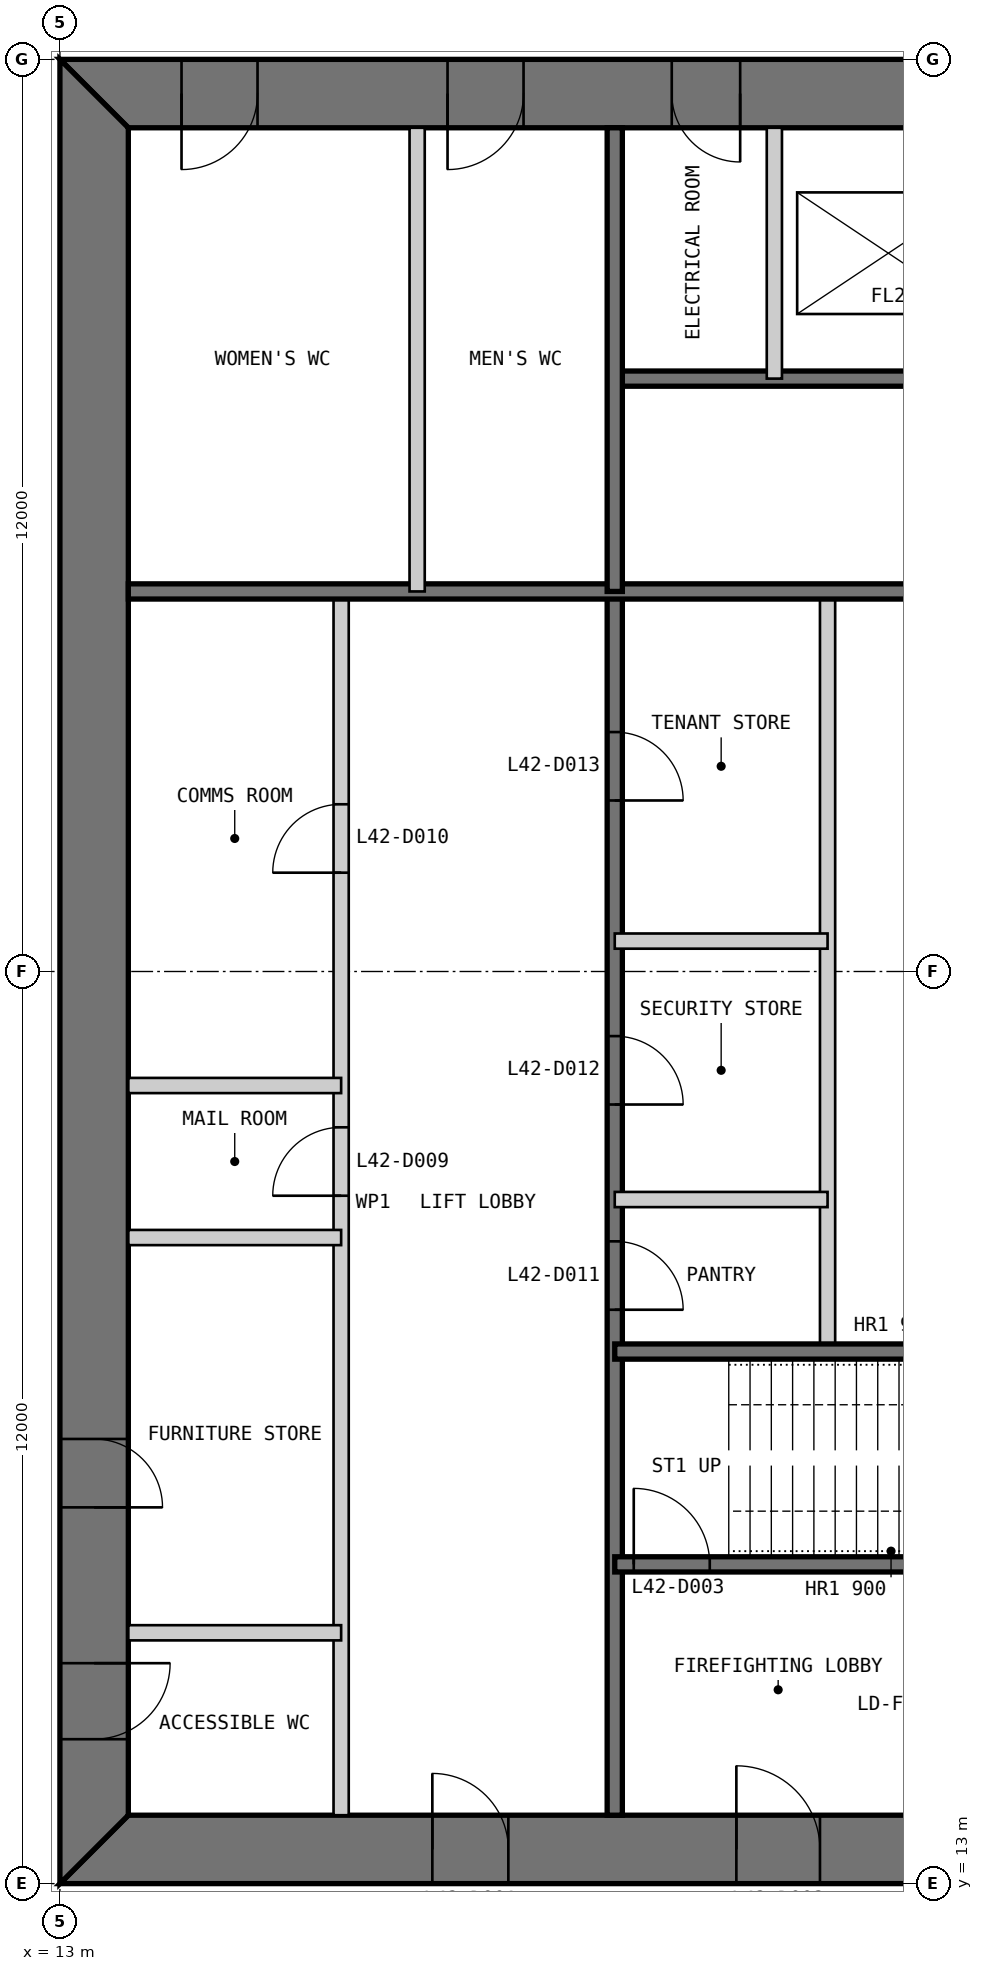
"""IFC4 building model, lengths in metres.
Left out: names, types, materials, properties, quantities, classifications, styles, units other than length and angle.
Written with IfcOpenShell. Run it as: python <this file> out.ifc"""

import sys

from ifc_helpers import new_model, si_unit, direction, frame, frame_2d, origin, place, context, subcontext, project, spatial, polyline, rectangle, outline, extrude, element, fill, save


model = new_model("IFC4")
c1 = context("Model", 3, precision=1e-05, world=origin(), true_north=direction((0.0, 1.0)))
c2 = subcontext(c1, "Body", "Model", "MODEL_VIEW")
j1 = project(units=[si_unit("LENGTHUNIT", "METRE"), si_unit("PLANEANGLEUNIT", "RADIAN")], contexts=[c1])
p1 = place(None, origin())
s1 = spatial("IfcSite", under=j1, at=p1, CompositionType="ELEMENT")
p2 = place(p1, origin())
s2 = spatial("IfcBuilding", under=s1, at=p2, CompositionType="ELEMENT")
p3 = place(p2, frame((0.0, 0.0, 181.8)))
s3 = spatial("IfcBuildingStorey", under=s2, at=p3, CompositionType="ELEMENT", Elevation=181.8)
p4 = place(p3, frame((13.0, 13.45, 0.0), z_axis=(0.0, 0.0, 1.0), x_axis=(1.0, 0.0, 0.0)))
e1 = element("IfcWall", 1, at=p4, inside=s3, PredefinedType="SHEAR", context=c2, shape_type="SweptSolid", body=[
    extrude(outline(polyline([(0.0, -0.45), (24.0, -0.45), (23.1, 0.45), (0.9, 0.45), (0.0, -0.45)])), origin(), (0.0, 0.0, 1.0), 4.0),
])
p5 = place(p4, frame((4.9, 0.0, 0.0)))
e2 = element("IfcOpeningElement", 2, at=p5, cuts=e1, PredefinedType="OPENING", context=c2, shape_type="SweptSolid", body=[
    extrude(rectangle(XDim=1.0, YDim=2.2, at=frame_2d((0.5, 1.1))), frame((0.0, 0.46, 0.0), z_axis=(0.0, -1.0, 0.0), x_axis=(1.0, 0.0, 0.0)), (0.0, 0.0, 1.0), 0.92),
])
p6 = place(p4, frame((8.9, 0.0, 0.0)))
e3 = element("IfcOpeningElement", 3, at=p6, cuts=e1, PredefinedType="OPENING", context=c2, shape_type="SweptSolid", body=[
    extrude(rectangle(XDim=1.1, YDim=2.2, at=frame_2d((0.55, 1.1))), frame((0.0, 0.46, 0.0), z_axis=(0.0, -1.0, 0.0), x_axis=(1.0, 0.0, 0.0)), (0.0, 0.0, 1.0), 0.92),
])
p7 = place(p4, frame((15.05, 0.0, 0.0)))
e4 = element("IfcOpeningElement", 4, at=p7, cuts=e1, PredefinedType="OPENING", context=c2, shape_type="SweptSolid", body=[
    extrude(rectangle(XDim=0.9, YDim=2.2, at=frame_2d((0.45, 1.1))), frame((0.0, 0.46, 0.0), z_axis=(0.0, -1.0, 0.0), x_axis=(1.0, 0.0, 0.0)), (0.0, 0.0, 1.0), 0.92),
])
p8 = place(p4, frame((17.9, 0.0, 0.0)))
e5 = element("IfcOpeningElement", 5, at=p8, cuts=e1, PredefinedType="OPENING", context=c2, shape_type="SweptSolid", body=[
    extrude(rectangle(XDim=1.0, YDim=2.2, at=frame_2d((0.5, 1.1))), frame((0.0, 0.46, 0.0), z_axis=(0.0, -1.0, 0.0), x_axis=(1.0, 0.0, 0.0)), (0.0, 0.0, 1.0), 0.92),
])
p9 = place(p4, frame((21.4, 0.0, 0.0)))
e6 = element("IfcOpeningElement", 6, at=p9, cuts=e1, PredefinedType="OPENING", context=c2, shape_type="SweptSolid", body=[
    extrude(rectangle(XDim=1.0, YDim=2.2, at=frame_2d((0.5, 1.1))), frame((0.0, 0.46, 0.0), z_axis=(0.0, -1.0, 0.0), x_axis=(1.0, 0.0, 0.0)), (0.0, 0.0, 1.0), 0.92),
])
p10 = place(p3, frame((37.0, 36.55, 0.0), z_axis=(0.0, 0.0, 1.0), x_axis=(-1.0, 0.0, 0.0)))
e7 = element("IfcWall", 7, at=p10, inside=s3, PredefinedType="SHEAR", context=c2, shape_type="SweptSolid", body=[
    extrude(outline(polyline([(0.0, -0.45), (24.0, -0.45), (23.1, 0.45), (0.9, 0.45), (0.0, -0.45)])), origin(), (0.0, 0.0, 1.0), 4.0),
])
p11 = place(p10, frame((4.9, 0.0, 0.0)))
e8 = element("IfcOpeningElement", 8, at=p11, cuts=e7, PredefinedType="OPENING", context=c2, shape_type="SweptSolid", body=[
    extrude(rectangle(XDim=1.0, YDim=2.2, at=frame_2d((0.5, 1.1))), frame((0.0, 0.46, 0.0), z_axis=(0.0, -1.0, 0.0), x_axis=(1.0, 0.0, 0.0)), (0.0, 0.0, 1.0), 0.92),
])
p12 = place(p10, frame((8.9, 0.0, 0.0)))
e9 = element("IfcOpeningElement", 9, at=p12, cuts=e7, PredefinedType="OPENING", context=c2, shape_type="SweptSolid", body=[
    extrude(rectangle(XDim=1.1, YDim=2.2, at=frame_2d((0.55, 1.1))), frame((0.0, 0.46, 0.0), z_axis=(0.0, -1.0, 0.0), x_axis=(1.0, 0.0, 0.0)), (0.0, 0.0, 1.0), 0.92),
])
p13 = place(p10, frame((15.05, 0.0, 0.0)))
e10 = element("IfcOpeningElement", 10, at=p13, cuts=e7, PredefinedType="OPENING", context=c2, shape_type="SweptSolid", body=[
    extrude(rectangle(XDim=0.9, YDim=2.2, at=frame_2d((0.45, 1.1))), frame((0.0, 0.46, 0.0), z_axis=(0.0, -1.0, 0.0), x_axis=(1.0, 0.0, 0.0)), (0.0, 0.0, 1.0), 0.92),
])
p14 = place(p10, frame((17.9, 0.0, 0.0)))
e11 = element("IfcOpeningElement", 11, at=p14, cuts=e7, PredefinedType="OPENING", context=c2, shape_type="SweptSolid", body=[
    extrude(rectangle(XDim=1.0, YDim=2.2, at=frame_2d((0.5, 1.1))), frame((0.0, 0.46, 0.0), z_axis=(0.0, -1.0, 0.0), x_axis=(1.0, 0.0, 0.0)), (0.0, 0.0, 1.0), 0.92),
])
p15 = place(p10, frame((21.4, 0.0, 0.0)))
e12 = element("IfcOpeningElement", 12, at=p15, cuts=e7, PredefinedType="OPENING", context=c2, shape_type="SweptSolid", body=[
    extrude(rectangle(XDim=1.0, YDim=2.2, at=frame_2d((0.5, 1.1))), frame((0.0, 0.46, 0.0), z_axis=(0.0, -1.0, 0.0), x_axis=(1.0, 0.0, 0.0)), (0.0, 0.0, 1.0), 0.92),
])
p16 = place(p3, frame((13.45, 36.1, 0.0), z_axis=(0.0, 0.0, 1.0), x_axis=(0.0, -1.0, 0.0)))
e13 = element("IfcWall", 13, at=p16, inside=s3, PredefinedType="SHEAR", context=c2, shape_type="SweptSolid", body=[
    extrude(outline(polyline([(-0.9, -0.45), (23.1, -0.45), (22.2, 0.45), (0.0, 0.45), (-0.9, -0.45)])), origin(), (0.0, 0.0, 1.0), 4.0),
])
p17 = place(p16, frame((20.2, 0.0, 0.0)))
e14 = element("IfcOpeningElement", 14, at=p17, cuts=e13, PredefinedType="OPENING", context=c2, shape_type="SweptSolid", body=[
    extrude(rectangle(XDim=1.0, YDim=2.2, at=frame_2d((0.5, 1.1))), frame((0.0, 0.46, 0.0), z_axis=(0.0, -1.0, 0.0), x_axis=(1.0, 0.0, 0.0)), (0.0, 0.0, 1.0), 0.92),
])
p18 = place(p16, frame((17.25, 0.0, 0.0)))
e15 = element("IfcOpeningElement", 15, at=p18, cuts=e13, PredefinedType="OPENING", context=c2, shape_type="SweptSolid", body=[
    extrude(rectangle(XDim=0.9, YDim=2.2, at=frame_2d((0.45, 1.1))), frame((0.0, 0.46, 0.0), z_axis=(0.0, -1.0, 0.0), x_axis=(1.0, 0.0, 0.0)), (0.0, 0.0, 1.0), 0.92),
])
p19 = place(p3, frame((16.7, 13.9, 0.0), z_axis=(0.0, 0.0, 1.0), x_axis=(0.0, 1.0, 0.0)))
e16 = element("IfcWall", 16, at=p19, inside=s3, PredefinedType="PARTITIONING", context=c2, shape_type="SweptSolid", body=[
    extrude(rectangle(XDim=16.1, YDim=0.2, at=frame_2d((8.05, 0.0))), origin(), (0.0, 0.0, 1.0), 3.8),
])
p20 = place(p19, frame((8.15, 0.0, 0.0)))
e17 = element("IfcOpeningElement", 17, at=p20, cuts=e16, PredefinedType="OPENING", context=c2, shape_type="SweptSolid", body=[
    extrude(rectangle(XDim=0.9, YDim=2.2, at=frame_2d((0.45, 1.1))), frame((0.0, 0.11, 0.0), z_axis=(0.0, -1.0, 0.0), x_axis=(1.0, 0.0, 0.0)), (0.0, 0.0, 1.0), 0.22),
])
p21 = place(p19, frame((12.4, 0.0, 0.0)))
e18 = element("IfcOpeningElement", 18, at=p21, cuts=e16, PredefinedType="OPENING", context=c2, shape_type="SweptSolid", body=[
    extrude(rectangle(XDim=0.9, YDim=2.2, at=frame_2d((0.45, 1.1))), frame((0.0, 0.11, 0.0), z_axis=(0.0, -1.0, 0.0), x_axis=(1.0, 0.0, 0.0)), (0.0, 0.0, 1.0), 0.22),
])
p22 = place(p3, frame((20.3, 13.9, 0.0), z_axis=(0.0, 0.0, 1.0), x_axis=(0.0, 1.0, 0.0)))
e19 = element("IfcWall", 19, at=p22, inside=s3, PredefinedType="SOLIDWALL", context=c2, shape_type="SweptSolid", body=[
    extrude(rectangle(XDim=16.1, YDim=0.2, at=frame_2d((8.05, 0.0))), origin(), (0.0, 0.0, 1.0), 3.8),
])
p23 = place(p22, frame((6.65, 0.0, 0.0)))
e20 = element("IfcOpeningElement", 20, at=p23, cuts=e19, PredefinedType="OPENING", context=c2, shape_type="SweptSolid", body=[
    extrude(rectangle(XDim=0.9, YDim=2.2, at=frame_2d((0.45, 1.1))), frame((0.0, 0.11, 0.0), z_axis=(0.0, -1.0, 0.0), x_axis=(1.0, 0.0, 0.0)), (0.0, 0.0, 1.0), 0.22),
])
p24 = place(p22, frame((9.35, 0.0, 0.0)))
e21 = element("IfcOpeningElement", 21, at=p24, cuts=e19, PredefinedType="OPENING", context=c2, shape_type="SweptSolid", body=[
    extrude(rectangle(XDim=0.9, YDim=2.2, at=frame_2d((0.45, 1.1))), frame((0.0, 0.11, 0.0), z_axis=(0.0, -1.0, 0.0), x_axis=(1.0, 0.0, 0.0)), (0.0, 0.0, 1.0), 0.22),
])
p25 = place(p22, frame((13.35, 0.0, 0.0)))
e22 = element("IfcOpeningElement", 22, at=p25, cuts=e19, PredefinedType="OPENING", context=c2, shape_type="SweptSolid", body=[
    extrude(rectangle(XDim=0.9, YDim=2.2, at=frame_2d((0.45, 1.1))), frame((0.0, 0.11, 0.0), z_axis=(0.0, -1.0, 0.0), x_axis=(1.0, 0.0, 0.0)), (0.0, 0.0, 1.0), 0.22),
])
p26 = place(p3, frame((23.1, 20.0, 0.0), z_axis=(0.0, 0.0, 1.0), x_axis=(0.0, 1.0, 0.0)))
e23 = element("IfcWall", 23, at=p26, inside=s3, PredefinedType="PARTITIONING", context=c2, shape_type="SweptSolid", body=[
    extrude(rectangle(XDim=10.0, YDim=0.2, at=frame_2d((5.0, 0.0))), origin(), (0.0, 0.0, 1.0), 3.8),
])
p27 = place(p3, frame((20.3, 17.2, 0.0), z_axis=(0.0, 0.0, 1.0), x_axis=(1.0, 0.0, 0.0)))
e24 = element("IfcWall", 24, at=p27, inside=s3, PredefinedType="SOLIDWALL", context=c2, shape_type="SweptSolid", body=[
    extrude(rectangle(XDim=9.4, YDim=0.2, at=frame_2d((4.7, 0.0))), origin(), (0.0, 0.0, 1.0), 3.8),
])
p28 = place(p27, frame((0.25, 0.0, 0.0)))
e25 = element("IfcOpeningElement", 25, at=p28, cuts=e24, PredefinedType="OPENING", context=c2, shape_type="SweptSolid", body=[
    extrude(rectangle(XDim=1.0, YDim=2.2, at=frame_2d((0.5, 1.1))), frame((0.0, 0.11, 0.0), z_axis=(0.0, -1.0, 0.0), x_axis=(1.0, 0.0, 0.0)), (0.0, 0.0, 1.0), 0.22),
])
p29 = place(p3, frame((20.3, 20.0, 0.0), z_axis=(0.0, 0.0, 1.0), x_axis=(1.0, 0.0, 0.0)))
e26 = element("IfcWall", 26, at=p29, inside=s3, PredefinedType="SOLIDWALL", context=c2, shape_type="SweptSolid", body=[
    extrude(rectangle(XDim=15.8, YDim=0.2, at=frame_2d((7.9, 0.0))), origin(), (0.0, 0.0, 1.0), 3.8),
])
for number, where, z_axis, x_axis in (
    (27, (13.9, 16.3, 0.0), (0.0, 0.0, 1.0), (1.0, 0.0, 0.0)),
    (28, (13.9, 21.5, 0.0), (0.0, 0.0, 1.0), (1.0, 0.0, 0.0)),
    (29, (13.9, 23.5, 0.0), (0.0, 0.0, 1.0), (1.0, 0.0, 0.0)),
    (30, (20.3, 22.0, 0.0), (0.0, 0.0, 1.0), (1.0, 0.0, 0.0)),
    (31, (20.3, 25.4, 0.0), (0.0, 0.0, 1.0), (1.0, 0.0, 0.0)),
):
    element("IfcWall", number, at=place(p3, frame(where, z_axis=z_axis, x_axis=x_axis)), inside=s3, PredefinedType="PARTITIONING", context=c2, shape_type="SweptSolid", body=[
        extrude(rectangle(XDim=2.8, YDim=0.2, at=frame_2d((1.4, 0.0))), origin(), (0.0, 0.0, 1.0), 3.8),
    ])
p30 = place(p3, frame((29.7, 32.8, 0.0), z_axis=(0.0, 0.0, 1.0), x_axis=(-1.0, 0.0, 0.0)))
e32 = element("IfcWall", 32, at=p30, inside=s3, PredefinedType="SOLIDWALL", context=c2, shape_type="SweptSolid", body=[
    extrude(rectangle(XDim=9.4, YDim=0.2, at=frame_2d((4.7, 0.0))), origin(), (0.0, 0.0, 1.0), 3.8),
])
p31 = place(p30, frame((0.25, 0.0, 0.0)))
e33 = element("IfcOpeningElement", 33, at=p31, cuts=e32, PredefinedType="OPENING", context=c2, shape_type="SweptSolid", body=[
    extrude(rectangle(XDim=1.0, YDim=2.2, at=frame_2d((0.5, 1.1))), frame((0.0, 0.11, 0.0), z_axis=(0.0, -1.0, 0.0), x_axis=(1.0, 0.0, 0.0)), (0.0, 0.0, 1.0), 0.22),
])
p32 = place(p3, frame((29.7, 30.0, 0.0), z_axis=(0.0, 0.0, 1.0), x_axis=(-1.0, 0.0, 0.0)))
e34 = element("IfcWall", 34, at=p32, inside=s3, PredefinedType="SOLIDWALL", context=c2, shape_type="SweptSolid", body=[
    extrude(rectangle(XDim=15.8, YDim=0.2, at=frame_2d((7.9, 0.0))), origin(), (0.0, 0.0, 1.0), 3.8),
])
p33 = place(p3, frame((22.4, 36.1, 0.0), z_axis=(0.0, 0.0, 1.0), x_axis=(0.0, -1.0, 0.0)))
e35 = element("IfcWall", 35, at=p33, inside=s3, PredefinedType="PARTITIONING", context=c2, shape_type="SweptSolid", body=[
    extrude(rectangle(XDim=3.3, YDim=0.2, at=frame_2d((1.65, 0.0))), origin(), (0.0, 0.0, 1.0), 3.8),
])
p34 = place(p3, frame((20.3, 36.1, 0.0), z_axis=(0.0, 0.0, 1.0), x_axis=(0.0, -1.0, 0.0)))
e36 = element("IfcWall", 36, at=p34, inside=s3, PredefinedType="SOLIDWALL", context=c2, shape_type="SweptSolid", body=[
    extrude(rectangle(XDim=6.1, YDim=0.2, at=frame_2d((3.05, 0.0))), origin(), (0.0, 0.0, 1.0), 3.8),
])
p35 = place(p3, frame((17.7, 36.1, 0.0), z_axis=(0.0, 0.0, 1.0), x_axis=(0.0, -1.0, 0.0)))
e37 = element("IfcWall", 37, at=p35, inside=s3, PredefinedType="PARTITIONING", context=c2, shape_type="SweptSolid", body=[
    extrude(rectangle(XDim=6.1, YDim=0.2, at=frame_2d((3.05, 0.0))), origin(), (0.0, 0.0, 1.0), 3.8),
])
p36 = place(p5, origin())
e38 = element("IfcDoor", 38, at=p36, inside=s3, OperationType="SINGLE_SWING_LEFT", PredefinedType="DOOR", context=c2, shape_type="SweptSolid", body=[
    extrude(rectangle(XDim=1.0, YDim=2.2, at=frame_2d((0.5, 1.1))), frame((0.0, 0.025, 0.0), z_axis=(0.0, -1.0, 0.0), x_axis=(1.0, 0.0, 0.0)), (0.0, 0.0, 1.0), 0.05),
    extrude(outline(polyline([(0.0, 0.0), (0.04, 0.0), (0.04, 2.16), (0.96, 2.16), (0.96, 0.0), (1.0, 0.0), (1.0, 2.2), (0.0, 2.2), (0.0, 0.0)])), frame((0.0, 0.3, 0.0), z_axis=(0.0, -1.0, 0.0), x_axis=(1.0, 0.0, 0.0)), (0.0, 0.0, 1.0), 0.6),
])
fill(e2, e38)
p37 = place(p6, origin())
e39 = element("IfcDoor", 39, at=p37, inside=s3, OperationType="SINGLE_SWING_LEFT", PredefinedType="DOOR", context=c2, shape_type="SweptSolid", body=[
    extrude(rectangle(XDim=1.1, YDim=2.2, at=frame_2d((0.55, 1.1))), frame((0.0, 0.025, 0.0), z_axis=(0.0, -1.0, 0.0), x_axis=(1.0, 0.0, 0.0)), (0.0, 0.0, 1.0), 0.05),
    extrude(outline(polyline([(0.0, 0.0), (0.04, 0.0), (0.04, 2.16), (1.06, 2.16), (1.06, 0.0), (1.1, 0.0), (1.1, 2.2), (0.0, 2.2), (0.0, 0.0)])), frame((0.0, 0.3, 0.0), z_axis=(0.0, -1.0, 0.0), x_axis=(1.0, 0.0, 0.0)), (0.0, 0.0, 1.0), 0.6),
])
fill(e3, e39)
p38 = place(p28, origin())
e40 = element("IfcDoor", 40, at=p38, inside=s3, OperationType="SINGLE_SWING_LEFT", PredefinedType="DOOR", context=c2, shape_type="SweptSolid", body=[
    extrude(rectangle(XDim=1.0, YDim=2.2, at=frame_2d((0.5, 1.1))), frame((0.0, 0.025, 0.0), z_axis=(0.0, -1.0, 0.0), x_axis=(1.0, 0.0, 0.0)), (0.0, 0.0, 1.0), 0.05),
])
fill(e25, e40)
p39 = place(p17, origin())
e41 = element("IfcDoor", 41, at=p39, inside=s3, OperationType="SINGLE_SWING_LEFT", PredefinedType="DOOR", context=c2, shape_type="SweptSolid", body=[
    extrude(rectangle(XDim=1.0, YDim=2.2, at=frame_2d((0.5, 1.1))), frame((0.0, 0.025, 0.0), z_axis=(0.0, -1.0, 0.0), x_axis=(1.0, 0.0, 0.0)), (0.0, 0.0, 1.0), 0.05),
    extrude(outline(polyline([(0.0, 0.0), (0.04, 0.0), (0.04, 2.16), (0.96, 2.16), (0.96, 0.0), (1.0, 0.0), (1.0, 2.2), (0.0, 2.2), (0.0, 0.0)])), frame((0.0, 0.3, 0.0), z_axis=(0.0, -1.0, 0.0), x_axis=(1.0, 0.0, 0.0)), (0.0, 0.0, 1.0), 0.6),
])
fill(e14, e41)
p40 = place(p18, origin())
e42 = element("IfcDoor", 42, at=p40, inside=s3, OperationType="SINGLE_SWING_RIGHT", PredefinedType="DOOR", context=c2, shape_type="SweptSolid", body=[
    extrude(rectangle(XDim=0.9, YDim=2.2, at=frame_2d((0.45, 1.1))), frame((0.0, 0.025, 0.0), z_axis=(0.0, -1.0, 0.0), x_axis=(1.0, 0.0, 0.0)), (0.0, 0.0, 1.0), 0.05),
    extrude(outline(polyline([(0.0, 0.0), (0.04, 0.0), (0.04, 2.16), (0.86, 2.16), (0.86, 0.0), (0.9, 0.0), (0.9, 2.2), (0.0, 2.2), (0.0, 0.0)])), frame((0.0, 0.3, 0.0), z_axis=(0.0, -1.0, 0.0), x_axis=(1.0, 0.0, 0.0)), (0.0, 0.0, 1.0), 0.6),
])
fill(e15, e42)
p41 = place(p20, origin())
e43 = element("IfcDoor", 43, at=p41, inside=s3, OperationType="SINGLE_SWING_LEFT", PredefinedType="DOOR", context=c2, shape_type="SweptSolid", body=[
    extrude(rectangle(XDim=0.9, YDim=2.2, at=frame_2d((0.45, 1.1))), frame((0.0, 0.025, 0.0), z_axis=(0.0, -1.0, 0.0), x_axis=(1.0, 0.0, 0.0)), (0.0, 0.0, 1.0), 0.05),
])
fill(e17, e43)
p42 = place(p21, origin())
e44 = element("IfcDoor", 44, at=p42, inside=s3, OperationType="SINGLE_SWING_LEFT", PredefinedType="DOOR", context=c2, shape_type="SweptSolid", body=[
    extrude(rectangle(XDim=0.9, YDim=2.2, at=frame_2d((0.45, 1.1))), frame((0.0, 0.025, 0.0), z_axis=(0.0, -1.0, 0.0), x_axis=(1.0, 0.0, 0.0)), (0.0, 0.0, 1.0), 0.05),
])
fill(e18, e44)
p43 = place(p23, frame((0.9, 0.0, 0.0), z_axis=(0.0, 0.0, 1.0), x_axis=(-1.0, 0.0, 0.0)))
e45 = element("IfcDoor", 45, at=p43, inside=s3, OperationType="SINGLE_SWING_RIGHT", PredefinedType="DOOR", context=c2, shape_type="SweptSolid", body=[
    extrude(rectangle(XDim=0.9, YDim=2.2, at=frame_2d((0.45, 1.1))), frame((0.0, 0.025, 0.0), z_axis=(0.0, -1.0, 0.0), x_axis=(1.0, 0.0, 0.0)), (0.0, 0.0, 1.0), 0.05),
])
fill(e20, e45)
p44 = place(p24, frame((0.9, 0.0, 0.0), z_axis=(0.0, 0.0, 1.0), x_axis=(-1.0, 0.0, 0.0)))
e46 = element("IfcDoor", 46, at=p44, inside=s3, OperationType="SINGLE_SWING_RIGHT", PredefinedType="DOOR", context=c2, shape_type="SweptSolid", body=[
    extrude(rectangle(XDim=0.9, YDim=2.2, at=frame_2d((0.45, 1.1))), frame((0.0, 0.025, 0.0), z_axis=(0.0, -1.0, 0.0), x_axis=(1.0, 0.0, 0.0)), (0.0, 0.0, 1.0), 0.05),
])
fill(e21, e46)
p45 = place(p25, frame((0.9, 0.0, 0.0), z_axis=(0.0, 0.0, 1.0), x_axis=(-1.0, 0.0, 0.0)))
e47 = element("IfcDoor", 47, at=p45, inside=s3, OperationType="SINGLE_SWING_RIGHT", PredefinedType="DOOR", context=c2, shape_type="SweptSolid", body=[
    extrude(rectangle(XDim=0.9, YDim=2.2, at=frame_2d((0.45, 1.1))), frame((0.0, 0.025, 0.0), z_axis=(0.0, -1.0, 0.0), x_axis=(1.0, 0.0, 0.0)), (0.0, 0.0, 1.0), 0.05),
])
fill(e22, e47)
p46 = place(p13, origin())
e48 = element("IfcDoor", 48, at=p46, inside=s3, OperationType="SINGLE_SWING_LEFT", PredefinedType="DOOR", context=c2, shape_type="SweptSolid", body=[
    extrude(rectangle(XDim=0.9, YDim=2.2, at=frame_2d((0.45, 1.1))), frame((0.0, 0.025, 0.0), z_axis=(0.0, -1.0, 0.0), x_axis=(1.0, 0.0, 0.0)), (0.0, 0.0, 1.0), 0.05),
    extrude(outline(polyline([(0.0, 0.0), (0.04, 0.0), (0.04, 2.16), (0.86, 2.16), (0.86, 0.0), (0.9, 0.0), (0.9, 2.2), (0.0, 2.2), (0.0, 0.0)])), frame((0.0, 0.3, 0.0), z_axis=(0.0, -1.0, 0.0), x_axis=(1.0, 0.0, 0.0)), (0.0, 0.0, 1.0), 0.6),
])
fill(e10, e48)
p47 = place(p14, origin())
e49 = element("IfcDoor", 49, at=p47, inside=s3, OperationType="SINGLE_SWING_RIGHT", PredefinedType="DOOR", context=c2, shape_type="SweptSolid", body=[
    extrude(rectangle(XDim=1.0, YDim=2.2, at=frame_2d((0.5, 1.1))), frame((0.0, 0.025, 0.0), z_axis=(0.0, -1.0, 0.0), x_axis=(1.0, 0.0, 0.0)), (0.0, 0.0, 1.0), 0.05),
    extrude(outline(polyline([(0.0, 0.0), (0.04, 0.0), (0.04, 2.16), (0.96, 2.16), (0.96, 0.0), (1.0, 0.0), (1.0, 2.2), (0.0, 2.2), (0.0, 0.0)])), frame((0.0, 0.3, 0.0), z_axis=(0.0, -1.0, 0.0), x_axis=(1.0, 0.0, 0.0)), (0.0, 0.0, 1.0), 0.6),
])
fill(e11, e49)
p48 = place(p15, origin())
e50 = element("IfcDoor", 50, at=p48, inside=s3, OperationType="SINGLE_SWING_RIGHT", PredefinedType="DOOR", context=c2, shape_type="SweptSolid", body=[
    extrude(rectangle(XDim=1.0, YDim=2.2, at=frame_2d((0.5, 1.1))), frame((0.0, 0.025, 0.0), z_axis=(0.0, -1.0, 0.0), x_axis=(1.0, 0.0, 0.0)), (0.0, 0.0, 1.0), 0.05),
    extrude(outline(polyline([(0.0, 0.0), (0.04, 0.0), (0.04, 2.16), (0.96, 2.16), (0.96, 0.0), (1.0, 0.0), (1.0, 2.2), (0.0, 2.2), (0.0, 0.0)])), frame((0.0, 0.3, 0.0), z_axis=(0.0, -1.0, 0.0), x_axis=(1.0, 0.0, 0.0)), (0.0, 0.0, 1.0), 0.6),
])
fill(e12, e50)
save(model, sys.argv[1])
